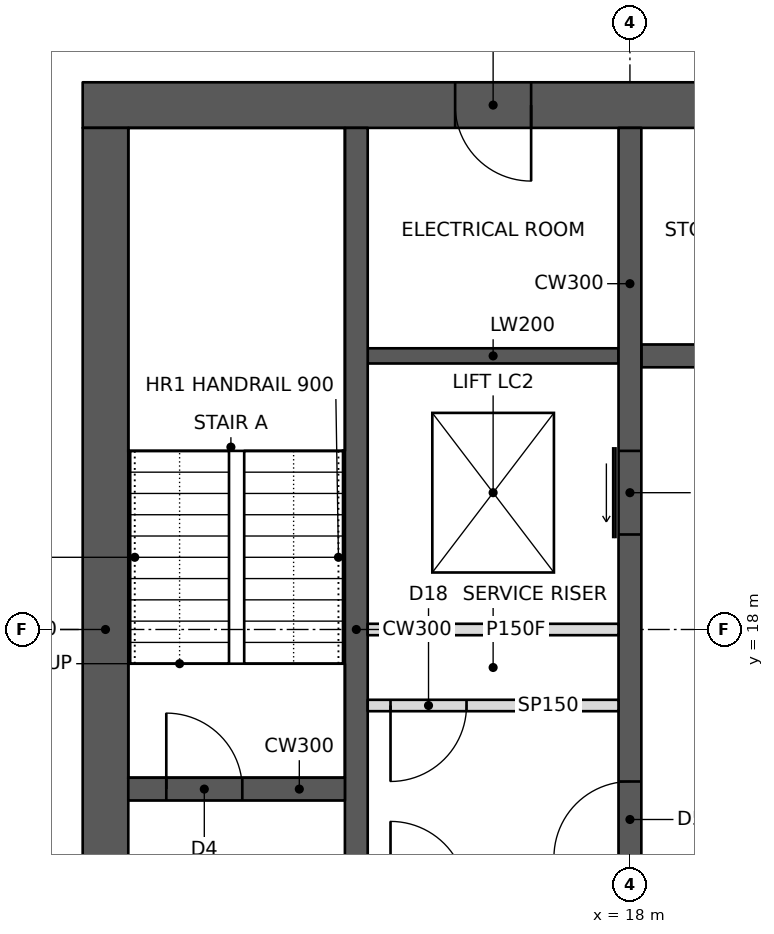
"""IFC4 building model, lengths in metres.
Left out: names, types, materials, properties, quantities, classifications, styles, units other than length and angle.
Written with IfcOpenShell. Run it as: python <this file> out.ifc"""

import sys

from ifc_helpers import new_model, si_unit, direction, frame, frame_2d, origin, place, context, subcontext, project, spatial, rectangle, extrude, element, fill, save


model = new_model("IFC4")
c1 = context("Model", 3, precision=1e-05, world=origin(), true_north=direction((0.0, 1.0)))
c2 = subcontext(c1, "Body", "Model", "MODEL_VIEW")
j1 = project(units=[si_unit("LENGTHUNIT", "METRE"), si_unit("PLANEANGLEUNIT", "RADIAN")], contexts=[c1])
p1 = place(None, origin())
s1 = spatial("IfcSite", under=j1, at=p1, CompositionType="ELEMENT")
p2 = place(p1, origin())
s2 = spatial("IfcBuilding", under=s1, at=p2, CompositionType="ELEMENT")
p3 = place(p2, frame((0.0, 0.0, 230.2)))
s3 = spatial("IfcBuildingStorey", under=s2, at=p3, CompositionType="ELEMENT", Elevation=230.2)
p4 = place(p3, frame((10.8, 24.9, 0.0), z_axis=(0.0, 0.0, 1.0), x_axis=(1.0, 0.0, 0.0)))
e1 = element("IfcWall", 1, at=p4, inside=s3, PredefinedType="SHEAR", context=c2, shape_type="SweptSolid", body=[
    extrude(rectangle(XDim=23.4, YDim=0.6, at=frame_2d((11.7, 0.0))), origin(), (0.0, 0.0, 1.0), 3.6),
])
p5 = place(p4, frame((17.2, 0.0, 0.0)))
e2 = element("IfcOpeningElement", 2, at=p5, cuts=e1, PredefinedType="OPENING", context=c2, shape_type="SweptSolid", body=[
    extrude(rectangle(XDim=1.8, YDim=2.1, at=frame_2d((0.9, 1.05))), frame((0.0, 0.31, 0.0), z_axis=(0.0, -1.0, 0.0), x_axis=(1.0, 0.0, 0.0)), (0.0, 0.0, 1.0), 0.62),
])
p6 = place(p4, frame((21.1, 0.0, 0.0)))
e3 = element("IfcOpeningElement", 3, at=p6, cuts=e1, PredefinedType="OPENING", context=c2, shape_type="SweptSolid", body=[
    extrude(rectangle(XDim=1.0, YDim=2.1, at=frame_2d((0.5, 1.05))), frame((0.0, 0.31, 0.0), z_axis=(0.0, -1.0, 0.0), x_axis=(1.0, 0.0, 0.0)), (0.0, 0.0, 1.0), 0.62),
])
p7 = place(p4, frame((4.9, 0.0, 0.0)))
e4 = element("IfcOpeningElement", 4, at=p7, cuts=e1, PredefinedType="OPENING", context=c2, shape_type="SweptSolid", body=[
    extrude(rectangle(XDim=1.0, YDim=2.1, at=frame_2d((0.5, 1.05))), frame((0.0, 0.31, 0.0), z_axis=(0.0, -1.0, 0.0), x_axis=(1.0, 0.0, 0.0)), (0.0, 0.0, 1.0), 0.62),
])
p8 = place(p3, frame((11.1, 11.4, 0.0), z_axis=(0.0, 0.0, 1.0), x_axis=(0.0, 1.0, 0.0)))
e5 = element("IfcWall", 5, at=p8, inside=s3, PredefinedType="SHEAR", context=c2, shape_type="SweptSolid", body=[
    extrude(rectangle(XDim=13.2, YDim=0.6, at=frame_2d((6.6, 0.0))), origin(), (0.0, 0.0, 1.0), 3.6),
])
p9 = place(p3, frame((14.4, 11.4, 0.0), z_axis=(0.0, 0.0, 1.0), x_axis=(0.0, 1.0, 0.0)))
e6 = element("IfcWall", 6, at=p9, inside=s3, PredefinedType="SHEAR", context=c2, shape_type="SweptSolid", body=[
    extrude(rectangle(XDim=13.2, YDim=0.3, at=frame_2d((6.6, 0.0))), origin(), (0.0, 0.0, 1.0), 3.6),
])
p10 = place(p3, frame((11.4, 15.9, 0.0), z_axis=(0.0, 0.0, 1.0), x_axis=(1.0, 0.0, 0.0)))
e7 = element("IfcWall", 7, at=p10, inside=s3, PredefinedType="SHEAR", context=c2, shape_type="SweptSolid", body=[
    extrude(rectangle(XDim=2.85, YDim=0.3, at=frame_2d((1.425, 0.0))), origin(), (0.0, 0.0, 1.0), 3.6),
])
p11 = place(p10, frame((0.5, 0.0, 0.0)))
e8 = element("IfcOpeningElement", 8, at=p11, cuts=e7, PredefinedType="OPENING", context=c2, shape_type="SweptSolid", body=[
    extrude(rectangle(XDim=1.0, YDim=2.1, at=frame_2d((0.5, 1.05))), frame((0.0, 0.16, 0.0), z_axis=(0.0, -1.0, 0.0), x_axis=(1.0, 0.0, 0.0)), (0.0, 0.0, 1.0), 0.32),
])
p12 = place(p3, frame((18.0, 11.4, 0.0), z_axis=(0.0, 0.0, 1.0), x_axis=(0.0, 1.0, 0.0)))
e9 = element("IfcWall", 9, at=p12, inside=s3, PredefinedType="SHEAR", context=c2, shape_type="SweptSolid", body=[
    extrude(rectangle(XDim=13.2, YDim=0.3, at=frame_2d((6.6, 0.0))), origin(), (0.0, 0.0, 1.0), 3.6),
])
p13 = place(p12, frame((3.6, 0.0, 0.0)))
e10 = element("IfcOpeningElement", 10, at=p13, cuts=e9, PredefinedType="OPENING", context=c2, shape_type="SweptSolid", body=[
    extrude(rectangle(XDim=1.0, YDim=2.1, at=frame_2d((0.5, 1.05))), frame((0.0, 0.16, 0.0), z_axis=(0.0, -1.0, 0.0), x_axis=(1.0, 0.0, 0.0)), (0.0, 0.0, 1.0), 0.32),
])
p14 = place(p12, frame((7.85, 0.0, 0.0)))
e11 = element("IfcOpeningElement", 11, at=p14, cuts=e9, PredefinedType="OPENING", context=c2, shape_type="SweptSolid", body=[
    extrude(rectangle(XDim=1.1, YDim=2.1, at=frame_2d((0.55, 1.05))), frame((0.0, 0.16, 0.0), z_axis=(0.0, -1.0, 0.0), x_axis=(1.0, 0.0, 0.0)), (0.0, 0.0, 1.0), 0.32),
])
p15 = place(p3, frame((14.55, 18.0, 0.0), z_axis=(0.0, 0.0, 1.0), x_axis=(1.0, 0.0, 0.0)))
e12 = element("IfcWall", 12, at=p15, inside=s3, PredefinedType="PARTITIONING", context=c2, shape_type="SweptSolid", body=[
    extrude(rectangle(XDim=3.3, YDim=0.15, at=frame_2d((1.65, 0.0))), origin(), (0.0, 0.0, 1.0), 3.4),
])
p16 = place(p3, frame((18.15, 21.6, 0.0), z_axis=(0.0, 0.0, 1.0), x_axis=(1.0, 0.0, 0.0)))
e13 = element("IfcWall", 13, at=p16, inside=s3, PredefinedType="SHEAR", context=c2, shape_type="SweptSolid", body=[
    extrude(rectangle(XDim=9.0, YDim=0.3, at=frame_2d((4.5, 0.0))), origin(), (0.0, 0.0, 1.0), 3.6),
])
p17 = place(p16, frame((6.75, 0.0, 0.0)))
e14 = element("IfcOpeningElement", 14, at=p17, cuts=e13, PredefinedType="OPENING", context=c2, shape_type="SweptSolid", body=[
    extrude(rectangle(XDim=1.2, YDim=2.1, at=frame_2d((0.6, 1.05))), frame((0.0, 0.16, 0.0), z_axis=(0.0, -1.0, 0.0), x_axis=(1.0, 0.0, 0.0)), (0.0, 0.0, 1.0), 0.32),
])
p18 = place(p16, frame((0.8, 0.0, 0.0)))
e15 = element("IfcOpeningElement", 15, at=p18, cuts=e13, PredefinedType="OPENING", context=c2, shape_type="SweptSolid", body=[
    extrude(rectangle(XDim=1.1, YDim=2.1, at=frame_2d((0.55, 1.05))), frame((0.0, 0.16, 0.0), z_axis=(0.0, -1.0, 0.0), x_axis=(1.0, 0.0, 0.0)), (0.0, 0.0, 1.0), 0.32),
])
p19 = place(p16, frame((3.8, 0.0, 0.0)))
e16 = element("IfcOpeningElement", 16, at=p19, cuts=e13, PredefinedType="OPENING", context=c2, shape_type="SweptSolid", body=[
    extrude(rectangle(XDim=1.1, YDim=2.1, at=frame_2d((0.55, 1.05))), frame((0.0, 0.16, 0.0), z_axis=(0.0, -1.0, 0.0), x_axis=(1.0, 0.0, 0.0)), (0.0, 0.0, 1.0), 0.32),
])
p20 = place(p3, frame((14.55, 21.6, 0.0), z_axis=(0.0, 0.0, 1.0), x_axis=(1.0, 0.0, 0.0)))
e17 = element("IfcWall", 17, at=p20, inside=s3, PredefinedType="SHEAR", context=c2, shape_type="SweptSolid", body=[
    extrude(rectangle(XDim=3.3, YDim=0.2, at=frame_2d((1.65, 0.0))), origin(), (0.0, 0.0, 1.0), 3.6),
])
p21 = place(p3, frame((14.55, 17.0, 0.0), z_axis=(0.0, 0.0, 1.0), x_axis=(1.0, 0.0, 0.0)))
e18 = element("IfcWall", 18, at=p21, inside=s3, PredefinedType="PARTITIONING", context=c2, shape_type="SweptSolid", body=[
    extrude(rectangle(XDim=3.3, YDim=0.15, at=frame_2d((1.65, 0.0))), origin(), (0.0, 0.0, 1.0), 3.4),
])
p22 = place(p21, frame((0.3, 0.0, 0.0)))
e19 = element("IfcOpeningElement", 19, at=p22, cuts=e18, PredefinedType="OPENING", context=c2, shape_type="SweptSolid", body=[
    extrude(rectangle(XDim=1.0, YDim=2.1, at=frame_2d((0.5, 1.05))), frame((0.0, 0.085, 0.0), z_axis=(0.0, -1.0, 0.0), x_axis=(1.0, 0.0, 0.0)), (0.0, 0.0, 1.0), 0.17),
])
p23 = place(p22, frame((1.0, 0.0, 0.0), z_axis=(0.0, 0.0, 1.0), x_axis=(-1.0, 0.0, 0.0)))
e20 = element("IfcDoor", 20, at=p23, inside=s3, OperationType="SINGLE_SWING_RIGHT", PredefinedType="DOOR", context=c2, shape_type="SweptSolid", body=[
    extrude(rectangle(XDim=1.0, YDim=2.1, at=frame_2d((0.5, 1.05))), frame((0.0, 0.025, 0.0), z_axis=(0.0, -1.0, 0.0), x_axis=(1.0, 0.0, 0.0)), (0.0, 0.0, 1.0), 0.05),
])
fill(e19, e20)
p24 = place(p11, origin())
e21 = element("IfcDoor", 21, at=p24, inside=s3, OperationType="SINGLE_SWING_LEFT", PredefinedType="DOOR", context=c2, shape_type="SweptSolid", body=[
    extrude(rectangle(XDim=1.0, YDim=2.1, at=frame_2d((0.5, 1.05))), frame((0.0, 0.025, 0.0), z_axis=(0.0, -1.0, 0.0), x_axis=(1.0, 0.0, 0.0)), (0.0, 0.0, 1.0), 0.05),
])
fill(e8, e21)
p25 = place(p13, origin())
e22 = element("IfcDoor", 22, at=p25, inside=s3, OperationType="SINGLE_SWING_LEFT", PredefinedType="DOOR", context=c2, shape_type="SweptSolid", body=[
    extrude(rectangle(XDim=1.0, YDim=2.1, at=frame_2d((0.5, 1.05))), frame((0.0, 0.025, 0.0), z_axis=(0.0, -1.0, 0.0), x_axis=(1.0, 0.0, 0.0)), (0.0, 0.0, 1.0), 0.05),
])
fill(e10, e22)
p26 = place(p7, frame((1.0, 0.0, 0.0), z_axis=(0.0, 0.0, 1.0), x_axis=(-1.0, 0.0, 0.0)))
e23 = element("IfcDoor", 23, at=p26, inside=s3, OperationType="SINGLE_SWING_LEFT", PredefinedType="DOOR", context=c2, shape_type="SweptSolid", body=[
    extrude(rectangle(XDim=1.0, YDim=2.1, at=frame_2d((0.5, 1.05))), frame((0.0, 0.025, 0.0), z_axis=(0.0, -1.0, 0.0), x_axis=(1.0, 0.0, 0.0)), (0.0, 0.0, 1.0), 0.05),
])
fill(e4, e23)
p27 = place(p14, origin())
e24 = element("IfcDoor", 24, at=p27, inside=s3, OperationType="SLIDING_TO_LEFT", PredefinedType="DOOR", context=c2, shape_type="SweptSolid", body=[
    extrude(rectangle(XDim=1.1, YDim=2.1, at=frame_2d((0.55, 1.05))), frame((0.0, 0.025, 0.0), z_axis=(0.0, -1.0, 0.0), x_axis=(1.0, 0.0, 0.0)), (0.0, 0.0, 1.0), 0.05),
])
fill(e11, e24)
save(model, sys.argv[1])
